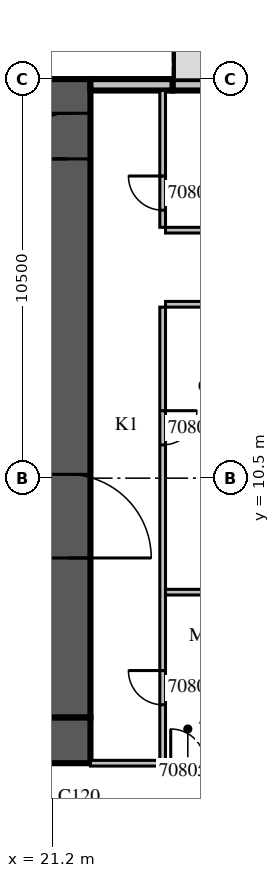
"""IFC4 building model, lengths in metres.
Left out: names, types, materials, properties, quantities, classifications, styles, units other than length and angle.
Written with IfcOpenShell. Run it as: python <this file> out.ifc"""

import sys

from ifc_helpers import new_model, si_unit, direction, frame, frame_2d, origin, place, context, subcontext, project, spatial, rectangle, extrude, source, transform, mapped, element, fill, save


model = new_model("IFC4")
c1 = context("Model", 3, precision=1e-05, world=origin(), true_north=direction((0.0, 1.0)))
c2 = subcontext(c1, "Body", "Model", "MODEL_VIEW")
j1 = project(units=[si_unit("LENGTHUNIT", "METRE"), si_unit("PLANEANGLEUNIT", "RADIAN")], contexts=[c1])
p1 = place(None, origin())
s1 = spatial("IfcSite", under=j1, at=p1, CompositionType="ELEMENT")
p2 = place(p1, origin())
s2 = spatial("IfcBuilding", under=s1, at=p2, CompositionType="ELEMENT")
p3 = place(p2, frame((0.0, 0.0, 44.7)))
s3 = spatial("IfcBuildingStorey", under=s2, at=p3, CompositionType="ELEMENT", Elevation=44.7)
m1 = source(origin(), c2, "Body", "SweptSolid", [
    extrude(rectangle(XDim=16.8, YDim=1.2, at=frame_2d((8.4, 0.0))), origin(), (0.0, 0.0, 1.0), 4.2),
])
p4 = place(p3, frame((21.6, 4.2, 0.0), z_axis=(0.0, 0.0, 1.0), x_axis=(0.0, 1.0, 0.0)))
e1 = element("IfcWall", 1, at=p4, inside=s3, PredefinedType="SHEAR", context=c2, shape_type="MappedRepresentation", body=[
    mapped(m1, transform((0.0, 0.0, 0.0), scale=1.0)),
])
m2 = source(origin(), c2, "Body", "SweptSolid", [
    extrude(rectangle(XDim=2.2, YDim=2.1, at=frame_2d((1.1, 1.05))), frame((0.0, 0.61, 0.0), z_axis=(0.0, -1.0, 0.0), x_axis=(1.0, 0.0, 0.0)), (0.0, 0.0, 1.0), 1.22),
])
p5 = place(p4, frame((4.2, 0.0, 0.0)))
e2 = element("IfcOpeningElement", 2, at=p5, cuts=e1, PredefinedType="OPENING", context=c2, shape_type="MappedRepresentation", body=[
    mapped(m2, transform((0.0, 0.0, 0.0), scale=1.0)),
])
m3 = source(origin(), c2, "Body", "SweptSolid", [
    extrude(rectangle(XDim=1.2, YDim=2.1, at=frame_2d((0.6, 1.05))), frame((0.0, 0.61, 0.0), z_axis=(0.0, -1.0, 0.0), x_axis=(1.0, 0.0, 0.0)), (0.0, 0.0, 1.0), 1.22),
])
p6 = place(p4, frame((14.7, 0.0, 0.0)))
e3 = element("IfcOpeningElement", 3, at=p6, cuts=e1, PredefinedType="OPENING", context=c2, shape_type="MappedRepresentation", body=[
    mapped(m3, transform((0.0, 0.0, 0.0), scale=1.0)),
])
m4 = source(origin(), c2, "Body", "SweptSolid", [
    extrude(rectangle(XDim=18.0, YDim=1.2, at=frame_2d((9.0, 0.0))), origin(), (0.0, 0.0, 1.0), 4.2),
])
p7 = place(p3, frame((4.2, 3.6, 0.0), z_axis=(0.0, 0.0, 1.0), x_axis=(1.0, 0.0, 0.0)))
e4 = element("IfcWall", 4, at=p7, inside=s3, PredefinedType="SHEAR", context=c2, shape_type="MappedRepresentation", body=[
    mapped(m4, transform((0.0, 0.0, 0.0), scale=1.0)),
])
p8 = place(p3, frame((28.8, 20.85, 0.0), z_axis=(0.0, 0.0, 1.0), x_axis=(-1.0, 0.0, 0.0)))
e5 = element("IfcWall", 5, at=p8, inside=s3, PredefinedType="STANDARD", context=c2, shape_type="SweptSolid", body=[
    extrude(rectangle(XDim=4.44, YDim=0.3, at=frame_2d((2.22, 0.0))), origin(), (0.0, 0.0, 1.0), 3.8),
])
m5 = source(origin(), c2, "Body", "SweptSolid", [
    extrude(rectangle(XDim=1.8, YDim=2.4, at=frame_2d((0.9, 1.2))), frame((0.0, 0.16, 0.0), z_axis=(0.0, -1.0, 0.0), x_axis=(1.0, 0.0, 0.0)), (0.0, 0.0, 1.0), 0.32),
])
p9 = place(p8, frame((0.6, 0.0, 0.0)))
e6 = element("IfcOpeningElement", 6, at=p9, cuts=e5, PredefinedType="OPENING", context=c2, shape_type="MappedRepresentation", body=[
    mapped(m5, transform((0.0, 0.0, 0.0), scale=1.0)),
])
m6 = source(origin(), c2, "Body", "SweptSolid", [
    extrude(rectangle(XDim=2.16, YDim=0.3, at=frame_2d((1.08, 0.0))), origin(), (0.0, 0.0, 1.0), 3.8),
])
p10 = place(p3, frame((24.36, 20.85, 0.0), z_axis=(0.0, 0.0, 1.0), x_axis=(-1.0, 0.0, 0.0)))
e7 = element("IfcWall", 7, at=p10, inside=s3, PredefinedType="STANDARD", context=c2, shape_type="MappedRepresentation", body=[
    mapped(m6, transform((0.0, 0.0, 0.0), scale=1.0)),
])
m7 = source(origin(), c2, "Body", "SweptSolid", [
    extrude(rectangle(XDim=11.925, YDim=0.15, at=frame_2d((5.963, 0.0))), origin(), (0.0, 0.0, 1.0), 3.8),
])
p11 = place(p3, frame((24.1, 15.0, 0.0), z_axis=(0.0, 0.0, 1.0), x_axis=(0.0, -1.0, 0.0)))
e8 = element("IfcWall", 8, at=p11, inside=s3, PredefinedType="PARTITIONING", context=c2, shape_type="MappedRepresentation", body=[
    mapped(m7, transform((0.0, 0.0, 0.0), scale=1.0)),
])
m8 = source(origin(), c2, "Body", "SweptSolid", [
    extrude(rectangle(XDim=0.9, YDim=2.1, at=frame_2d((0.45, 1.05))), frame((0.0, 0.085, 0.0), z_axis=(0.0, -1.0, 0.0), x_axis=(1.0, 0.0, 0.0)), (0.0, 0.0, 1.0), 0.17),
])
p12 = place(p11, frame((9.562, 0.0, 0.0)))
e9 = element("IfcOpeningElement", 9, at=p12, cuts=e8, PredefinedType="OPENING", context=c2, shape_type="MappedRepresentation", body=[
    mapped(m8, transform((0.0, 0.0, 0.0), scale=1.0)),
])
p13 = place(p11, frame((2.725, 0.0, 0.0)))
e10 = element("IfcOpeningElement", 10, at=p13, cuts=e8, PredefinedType="OPENING", context=c2, shape_type="MappedRepresentation", body=[
    mapped(m8, transform((0.0, 0.0, 0.0), scale=1.0)),
])
m9 = source(origin(), c2, "Body", "SweptSolid", [
    extrude(rectangle(XDim=3.6, YDim=0.15, at=frame_2d((1.8, 0.0))), origin(), (0.0, 0.0, 1.0), 3.8),
])
p14 = place(p3, frame((24.1, 20.7, 0.0), z_axis=(0.0, 0.0, 1.0), x_axis=(0.0, -1.0, 0.0)))
e11 = element("IfcWall", 11, at=p14, inside=s3, PredefinedType="PARTITIONING", context=c2, shape_type="MappedRepresentation", body=[
    mapped(m9, transform((0.0, 0.0, 0.0), scale=1.0)),
])
p15 = place(p14, frame((2.25, 0.0, 0.0)))
e12 = element("IfcOpeningElement", 12, at=p15, cuts=e11, PredefinedType="OPENING", context=c2, shape_type="MappedRepresentation", body=[
    mapped(m8, transform((0.0, 0.0, 0.0), scale=1.0)),
])
m10 = source(origin(), c2, "Body", "SweptSolid", [
    extrude(rectangle(XDim=5.15, YDim=0.15, at=frame_2d((2.575, 0.0))), origin(), (0.0, 0.0, 1.0), 3.8),
])
for number, where, z_axis, x_axis in (
    (13, (29.325, 7.5, 0.0), (0.0, 0.0, 1.0), (-1.0, 0.0, 0.0)),
    (14, (29.325, 15.075, 0.0), (0.0, 0.0, 1.0), (-1.0, 0.0, 0.0)),
    (15, (24.175, 17.025, 0.0), (0.0, 0.0, 1.0), (1.0, 0.0, 0.0)),
):
    element("IfcWall", number, at=place(p3, frame(where, z_axis=z_axis, x_axis=x_axis)), inside=s3, PredefinedType="PARTITIONING", context=c2, shape_type="MappedRepresentation", body=[
        mapped(m10, transform((0.0, 0.0, 0.0), scale=1.0)),
    ])
m11 = source(origin(), c2, "Body", "SweptSolid", [
    extrude(rectangle(XDim=7.125, YDim=0.15, at=frame_2d((3.562, 0.0))), origin(), (0.0, 0.0, 1.0), 3.8),
])
p16 = place(p3, frame((22.2, 3.0, 0.0), z_axis=(0.0, 0.0, 1.0), x_axis=(1.0, 0.0, 0.0)))
e16 = element("IfcWall", 16, at=p16, inside=s3, PredefinedType="PARTITIONING", context=c2, shape_type="MappedRepresentation", body=[
    mapped(m11, transform((0.0, 0.0, 0.0), scale=1.0)),
])
m12 = source(origin(), c2, "Body", "SweptSolid", [
    extrude(rectangle(XDim=1.0, YDim=2.1, at=frame_2d((0.5, 1.05))), frame((0.0, 0.085, 0.0), z_axis=(0.0, -1.0, 0.0), x_axis=(1.0, 0.0, 0.0)), (0.0, 0.0, 1.0), 0.17),
])
p17 = place(p16, frame((3.1, 0.0, 0.0)))
e17 = element("IfcOpeningElement", 17, at=p17, cuts=e16, PredefinedType="OPENING", context=c2, shape_type="MappedRepresentation", body=[
    mapped(m12, transform((0.0, 0.0, 0.0), scale=1.0)),
])
p18 = place(p16, frame((2.112, 0.0, 0.0)))
e18 = element("IfcOpeningElement", 18, at=p18, cuts=e16, PredefinedType="OPENING", context=c2, shape_type="MappedRepresentation", body=[
    mapped(m8, transform((0.0, 0.0, 0.0), scale=1.0)),
])
m13 = source(origin(), c2, "Body", "SweptSolid", [
    extrude(rectangle(XDim=2.2, YDim=2.1, at=frame_2d((1.1, 1.05))), frame((0.0, 0.025, 0.0), z_axis=(0.0, -1.0, 0.0), x_axis=(1.0, 0.0, 0.0)), (0.0, 0.0, 1.0), 0.05),
])
p19 = place(p5, origin())
e19 = element("IfcDoor", 19, at=p19, inside=s3, OperationType="DOUBLE_DOOR_SINGLE_SWING", PredefinedType="DOOR", context=c2, shape_type="MappedRepresentation", body=[
    mapped(m13, transform((0.0, 0.0, 0.0), scale=1.0)),
])
fill(e2, e19)
m14 = source(origin(), c2, "Body", "SweptSolid", [
    extrude(rectangle(XDim=1.2, YDim=2.1, at=frame_2d((0.6, 1.05))), frame((0.0, 0.025, 0.0), z_axis=(0.0, -1.0, 0.0), x_axis=(1.0, 0.0, 0.0)), (0.0, 0.0, 1.0), 0.05),
])
p20 = place(p6, origin())
e20 = element("IfcDoor", 20, at=p20, inside=s3, OperationType="SINGLE_SWING_LEFT", PredefinedType="DOOR", context=c2, shape_type="MappedRepresentation", body=[
    mapped(m14, transform((0.0, 0.0, 0.0), scale=1.0)),
])
fill(e3, e20)
m15 = source(origin(), c2, "Body", "SweptSolid", [
    extrude(rectangle(XDim=0.9, YDim=2.1, at=frame_2d((0.45, 1.05))), frame((0.0, 0.025, 0.0), z_axis=(0.0, -1.0, 0.0), x_axis=(1.0, 0.0, 0.0)), (0.0, 0.0, 1.0), 0.05),
])
p21 = place(p12, origin())
e21 = element("IfcDoor", 21, at=p21, inside=s3, OperationType="SINGLE_SWING_RIGHT", PredefinedType="DOOR", context=c2, shape_type="MappedRepresentation", body=[
    mapped(m15, transform((0.0, 0.0, 0.0), scale=1.0)),
])
fill(e9, e21)
p22 = place(p13, origin())
e22 = element("IfcDoor", 22, at=p22, inside=s3, OperationType="SINGLE_SWING_LEFT", PredefinedType="DOOR", context=c2, shape_type="MappedRepresentation", body=[
    mapped(m15, transform((0.0, 0.0, 0.0), scale=1.0)),
])
fill(e10, e22)
p23 = place(p15, origin())
e23 = element("IfcDoor", 23, at=p23, inside=s3, OperationType="SINGLE_SWING_RIGHT", PredefinedType="DOOR", context=c2, shape_type="MappedRepresentation", body=[
    mapped(m15, transform((0.0, 0.0, 0.0), scale=1.0)),
])
fill(e12, e23)
p24 = place(p18, origin())
e24 = element("IfcDoor", 24, at=p24, inside=s3, OperationType="SINGLE_SWING_LEFT", PredefinedType="DOOR", context=c2, shape_type="MappedRepresentation", body=[
    mapped(m15, transform((0.0, 0.0, 0.0), scale=1.0)),
])
fill(e18, e24)
save(model, sys.argv[1])
